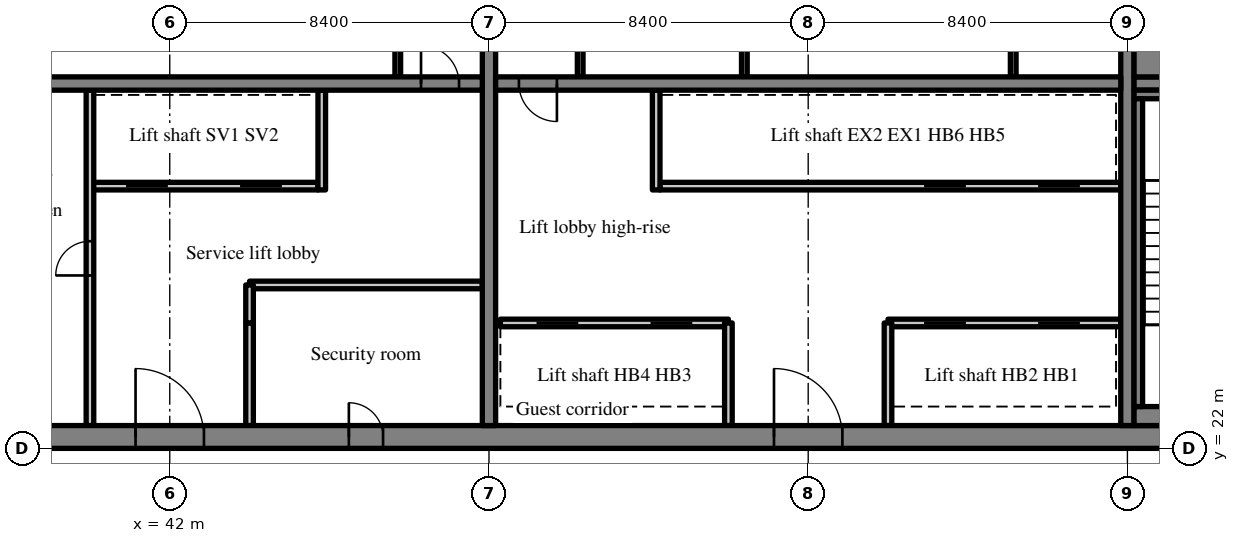
"""IFC4 building model, lengths in metres.
Left out: names, types, materials, properties, quantities, classifications, styles, units other than length and angle.
Written with IfcOpenShell. Run it as: python <this file> out.ifc"""

import sys

from ifc_helpers import new_model, si_unit, direction, frame, frame_2d, origin, place, context, subcontext, project, spatial, rectangle, extrude, source, transform, mapped, element, fill, save


model = new_model("IFC4")
c1 = context("Model", 3, precision=1e-05, world=origin(), true_north=direction((0.0, 1.0)))
c2 = subcontext(c1, "Body", "Model", "MODEL_VIEW")
j1 = project(units=[si_unit("LENGTHUNIT", "METRE"), si_unit("PLANEANGLEUNIT", "RADIAN")], contexts=[c1])
p1 = place(None, origin())
s1 = spatial("IfcSite", under=j1, at=p1, CompositionType="ELEMENT")
p2 = place(p1, origin())
s2 = spatial("IfcBuilding", under=s1, at=p2, CompositionType="ELEMENT")
p3 = place(p2, frame((0.0, 0.0, 260.8)))
s3 = spatial("IfcBuildingStorey", under=s2, at=p3, CompositionType="ELEMENT", Elevation=260.8)
m1 = source(origin(), c2, "Body", "SweptSolid", [
    extrude(rectangle(XDim=50.4, YDim=0.6, at=frame_2d((25.2, 0.0))), origin(), (0.0, 0.0, 1.0), 3.62),
])
p4 = place(p3, frame((25.2, 22.3, 0.0), z_axis=(0.0, 0.0, 1.0), x_axis=(1.0, 0.0, 0.0)))
e1 = element("IfcWall", 1, at=p4, inside=s3, PredefinedType="SHEAR", context=c2, shape_type="MappedRepresentation", body=[
    mapped(m1, transform((0.0, 0.0, 0.0), scale=1.0)),
])
m2 = source(origin(), c2, "Body", "SweptSolid", [
    extrude(rectangle(XDim=1.8, YDim=2.1, at=frame_2d((0.9, 1.05))), frame((0.0, 0.31, 0.0), z_axis=(0.0, -1.0, 0.0), x_axis=(1.0, 0.0, 0.0)), (0.0, 0.0, 1.0), 0.62),
])
p5 = place(p4, frame((15.9, 0.0, 0.0)))
e2 = element("IfcOpeningElement", 2, at=p5, cuts=e1, PredefinedType="OPENING", context=c2, shape_type="MappedRepresentation", body=[
    mapped(m2, transform((0.0, 0.0, 0.0), scale=1.0)),
])
m3 = source(origin(), c2, "Body", "SweptSolid", [
    extrude(rectangle(XDim=0.9, YDim=2.1, at=frame_2d((0.45, 1.05))), frame((0.0, 0.31, 0.0), z_axis=(0.0, -1.0, 0.0), x_axis=(1.0, 0.0, 0.0)), (0.0, 0.0, 1.0), 0.62),
])
p6 = place(p4, frame((9.687, 0.0, 0.0)))
e3 = element("IfcOpeningElement", 3, at=p6, cuts=e1, PredefinedType="OPENING", context=c2, shape_type="MappedRepresentation", body=[
    mapped(m3, transform((0.0, 0.0, 0.0), scale=1.0)),
])
p7 = place(p4, frame((21.513, 0.0, 0.0)))
e4 = element("IfcOpeningElement", 4, at=p7, cuts=e1, PredefinedType="OPENING", context=c2, shape_type="MappedRepresentation", body=[
    mapped(m3, transform((0.0, 0.0, 0.0), scale=1.0)),
])
p8 = place(p4, frame((32.7, 0.0, 0.0)))
e5 = element("IfcOpeningElement", 5, at=p8, cuts=e1, PredefinedType="OPENING", context=c2, shape_type="MappedRepresentation", body=[
    mapped(m2, transform((0.0, 0.0, 0.0), scale=1.0)),
])
m4 = source(origin(), c2, "Body", "SweptSolid", [
    extrude(rectangle(XDim=1.2, YDim=2.1, at=frame_2d((0.6, 1.05))), frame((0.0, 0.31, 0.0), z_axis=(0.0, -1.0, 0.0), x_axis=(1.0, 0.0, 0.0)), (0.0, 0.0, 1.0), 0.62),
])
p9 = place(p4, frame((6.488, 0.0, 0.0)))
e6 = element("IfcOpeningElement", 6, at=p9, cuts=e1, PredefinedType="OPENING", context=c2, shape_type="MappedRepresentation", body=[
    mapped(m4, transform((0.0, 0.0, 0.0), scale=1.0)),
])
p10 = place(p4, frame((47.925, 0.0, 0.0)))
e7 = element("IfcOpeningElement", 7, at=p10, cuts=e1, PredefinedType="OPENING", context=c2, shape_type="MappedRepresentation", body=[
    mapped(m4, transform((0.0, 0.0, 0.0), scale=1.0)),
])
m5 = source(origin(), c2, "Body", "SweptSolid", [
    extrude(rectangle(XDim=18.8, YDim=0.35, at=frame_2d((9.4, 0.0))), origin(), (0.0, 0.0, 1.0), 3.62),
])
p11 = place(p3, frame((50.4, 22.6, 0.0), z_axis=(0.0, 0.0, 1.0), x_axis=(0.0, 1.0, 0.0)))
e8 = element("IfcWall", 8, at=p11, inside=s3, PredefinedType="SHEAR", context=c2, shape_type="MappedRepresentation", body=[
    mapped(m5, transform((0.0, 0.0, 0.0), scale=1.0)),
])
m6 = source(origin(), c2, "Body", "SweptSolid", [
    extrude(rectangle(XDim=1.1, YDim=2.1, at=frame_2d((0.55, 1.05))), frame((0.0, 0.185, 0.0), z_axis=(0.0, -1.0, 0.0), x_axis=(1.0, 0.0, 0.0)), (0.0, 0.0, 1.0), 0.37),
])
p12 = place(p11, frame((12.85, 0.0, 0.0)))
e9 = element("IfcOpeningElement", 9, at=p12, cuts=e8, PredefinedType="OPENING", context=c2, shape_type="MappedRepresentation", body=[
    mapped(m6, transform((0.0, 0.0, 0.0), scale=1.0)),
])
p13 = place(p3, frame((67.2, 22.6, 0.0), z_axis=(0.0, 0.0, 1.0), x_axis=(0.0, 1.0, 0.0)))
e10 = element("IfcWall", 10, at=p13, inside=s3, PredefinedType="SHEAR", context=c2, shape_type="MappedRepresentation", body=[
    mapped(m5, transform((0.0, 0.0, 0.0), scale=1.0)),
])
m7 = source(origin(), c2, "Body", "SweptSolid", [
    extrude(rectangle(XDim=16.45, YDim=0.35, at=frame_2d((8.225, 0.0))), origin(), (0.0, 0.0, 1.0), 3.62),
])
p14 = place(p3, frame((33.775, 31.6, 0.0), z_axis=(0.0, 0.0, 1.0), x_axis=(1.0, 0.0, 0.0)))
e11 = element("IfcWall", 11, at=p14, inside=s3, PredefinedType="SHEAR", context=c2, shape_type="MappedRepresentation", body=[
    mapped(m7, transform((0.0, 0.0, 0.0), scale=1.0)),
])
m8 = source(origin(), c2, "Body", "SweptSolid", [
    extrude(rectangle(XDim=1.0, YDim=2.1, at=frame_2d((0.5, 1.05))), frame((0.0, 0.185, 0.0), z_axis=(0.0, -1.0, 0.0), x_axis=(1.0, 0.0, 0.0)), (0.0, 0.0, 1.0), 0.37),
])
p15 = place(p14, frame((14.837, 0.0, 0.0)))
e12 = element("IfcOpeningElement", 12, at=p15, cuts=e11, PredefinedType="OPENING", context=c2, shape_type="MappedRepresentation", body=[
    mapped(m8, transform((0.0, 0.0, 0.0), scale=1.0)),
])
m9 = source(origin(), c2, "Body", "SweptSolid", [
    extrude(rectangle(XDim=16.45, YDim=0.35, at=frame_2d((8.225, 0.0))), origin(), (0.0, 0.0, 1.0), 3.62),
])
p16 = place(p3, frame((50.575, 31.6, 0.0), z_axis=(0.0, 0.0, 1.0), x_axis=(1.0, 0.0, 0.0)))
e13 = element("IfcWall", 13, at=p16, inside=s3, PredefinedType="SHEAR", context=c2, shape_type="MappedRepresentation", body=[
    mapped(m9, transform((0.0, 0.0, 0.0), scale=1.0)),
])
p17 = place(p16, frame((0.613, 0.0, 0.0)))
e14 = element("IfcOpeningElement", 14, at=p17, cuts=e13, PredefinedType="OPENING", context=c2, shape_type="MappedRepresentation", body=[
    mapped(m8, transform((0.0, 0.0, 0.0), scale=1.0)),
])
m10 = source(origin(), c2, "Body", "SweptSolid", [
    extrude(rectangle(XDim=7.625, YDim=0.35, at=frame_2d((3.812, 0.0))), origin(), (0.0, 0.0, 1.0), 3.62),
])
p18 = place(p3, frame((67.375, 31.6, 0.0), z_axis=(0.0, 0.0, 1.0), x_axis=(1.0, 0.0, 0.0)))
e15 = element("IfcWall", 15, at=p18, inside=s3, PredefinedType="SHEAR", context=c2, shape_type="MappedRepresentation", body=[
    mapped(m10, transform((0.0, 0.0, 0.0), scale=1.0)),
])
p19 = place(p18, frame((5.8, 0.0, 0.0)))
e16 = element("IfcOpeningElement", 16, at=p19, cuts=e15, PredefinedType="OPENING", context=c2, shape_type="MappedRepresentation", body=[
    mapped(m6, transform((0.0, 0.0, 0.0), scale=1.0)),
])
m11 = source(origin(), c2, "Body", "SweptSolid", [
    extrude(rectangle(XDim=6.0, YDim=0.2, at=frame_2d((3.0, 0.0))), origin(), (0.0, 0.0, 1.0), 3.62),
])
p20 = place(p3, frame((39.9, 28.9, 0.0), z_axis=(0.0, 0.0, 1.0), x_axis=(1.0, 0.0, 0.0)))
e17 = element("IfcWall", 17, at=p20, inside=s3, PredefinedType="SOLIDWALL", context=c2, shape_type="MappedRepresentation", body=[
    mapped(m11, transform((0.0, 0.0, 0.0), scale=1.0)),
])
m12 = source(origin(), c2, "Body", "SweptSolid", [
    extrude(rectangle(XDim=1.1, YDim=2.1, at=frame_2d((0.55, 1.05))), frame((0.0, 0.11, 0.0), z_axis=(0.0, -1.0, 0.0), x_axis=(1.0, 0.0, 0.0)), (0.0, 0.0, 1.0), 0.22),
])
p21 = place(p20, frame((0.95, 0.0, 0.0)))
e18 = element("IfcOpeningElement", 18, at=p21, cuts=e17, PredefinedType="OPENING", context=c2, shape_type="MappedRepresentation", body=[
    mapped(m12, transform((0.0, 0.0, 0.0), scale=1.0)),
])
p22 = place(p20, frame((3.95, 0.0, 0.0)))
e19 = element("IfcOpeningElement", 19, at=p22, cuts=e17, PredefinedType="OPENING", context=c2, shape_type="MappedRepresentation", body=[
    mapped(m12, transform((0.0, 0.0, 0.0), scale=1.0)),
])
m13 = source(origin(), c2, "Body", "SweptSolid", [
    extrude(rectangle(XDim=8.825, YDim=0.2, at=frame_2d((4.413, 0.0))), origin(), (0.0, 0.0, 1.0), 3.62),
])
p23 = place(p3, frame((39.9, 22.6, 0.0), z_axis=(0.0, 0.0, 1.0), x_axis=(0.0, 1.0, 0.0)))
e20 = element("IfcWall", 20, at=p23, inside=s3, PredefinedType="PARTITIONING", context=c2, shape_type="MappedRepresentation", body=[
    mapped(m13, transform((0.0, 0.0, 0.0), scale=1.0)),
])
m14 = source(origin(), c2, "Body", "SweptSolid", [
    extrude(rectangle(XDim=0.9, YDim=2.1, at=frame_2d((0.45, 1.05))), frame((0.0, 0.11, 0.0), z_axis=(0.0, -1.0, 0.0), x_axis=(1.0, 0.0, 0.0)), (0.0, 0.0, 1.0), 0.22),
])
p24 = place(p23, frame((3.95, 0.0, 0.0)))
e21 = element("IfcOpeningElement", 21, at=p24, cuts=e20, PredefinedType="OPENING", context=c2, shape_type="MappedRepresentation", body=[
    mapped(m14, transform((0.0, 0.0, 0.0), scale=1.0)),
])
m15 = source(origin(), c2, "Body", "SweptSolid", [
    extrude(rectangle(XDim=2.7, YDim=0.2, at=frame_2d((1.35, 0.0))), origin(), (0.0, 0.0, 1.0), 3.62),
])
p25 = place(p3, frame((44.1, 22.6, 0.0), z_axis=(0.0, 0.0, 1.0), x_axis=(0.0, 1.0, 0.0)))
e22 = element("IfcWall", 22, at=p25, inside=s3, PredefinedType="PARTITIONING", context=c2, shape_type="MappedRepresentation", body=[
    mapped(m15, transform((0.0, 0.0, 0.0), scale=1.0)),
])
m16 = source(origin(), c2, "Body", "SweptSolid", [
    extrude(rectangle(XDim=2.625, YDim=0.2, at=frame_2d((1.312, 0.0))), origin(), (0.0, 0.0, 1.0), 3.62),
])
p26 = place(p3, frame((46.0, 28.8, 0.0), z_axis=(0.0, 0.0, 1.0), x_axis=(0.0, 1.0, 0.0)))
e23 = element("IfcWall", 23, at=p26, inside=s3, PredefinedType="SOLIDWALL", context=c2, shape_type="MappedRepresentation", body=[
    mapped(m16, transform((0.0, 0.0, 0.0), scale=1.0)),
])
m17 = source(origin(), c2, "Body", "SweptSolid", [
    extrude(rectangle(XDim=6.125, YDim=0.2, at=frame_2d((3.062, 0.0))), origin(), (0.0, 0.0, 1.0), 3.62),
])
p27 = place(p3, frame((44.1, 26.3, 0.0), z_axis=(0.0, 0.0, 1.0), x_axis=(1.0, 0.0, 0.0)))
e24 = element("IfcWall", 24, at=p27, inside=s3, PredefinedType="PARTITIONING", context=c2, shape_type="MappedRepresentation", body=[
    mapped(m17, transform((0.0, 0.0, 0.0), scale=1.0)),
])
m18 = source(origin(), c2, "Body", "SweptSolid", [
    extrude(rectangle(XDim=1.0, YDim=0.2, at=frame_2d((0.5, 0.0))), origin(), (0.0, 0.0, 1.0), 3.62),
])
p28 = place(p3, frame((44.1, 25.3, 0.0), z_axis=(0.0, 0.0, 1.0), x_axis=(0.0, 1.0, 0.0)))
e25 = element("IfcWall", 25, at=p28, inside=s3, PredefinedType="PARTITIONING", context=c2, shape_type="MappedRepresentation", body=[
    mapped(m18, transform((0.0, 0.0, 0.0), scale=1.0)),
])
m19 = source(origin(), c2, "Body", "SweptSolid", [
    extrude(rectangle(XDim=3.225, YDim=0.15, at=frame_2d((1.613, 0.0))), origin(), (0.0, 0.0, 1.0), 3.62),
])
p29 = place(p3, frame((48.0, 31.775, 0.0), z_axis=(0.0, 0.0, 1.0), x_axis=(0.0, 1.0, 0.0)))
e26 = element("IfcWall", 26, at=p29, inside=s3, PredefinedType="PARTITIONING", context=c2, shape_type="MappedRepresentation", body=[
    mapped(m19, transform((0.0, 0.0, 0.0), scale=1.0)),
])
p30 = place(p3, frame((67.025, 25.3, 0.0), z_axis=(0.0, 0.0, 1.0), x_axis=(-1.0, 0.0, 0.0)))
e27 = element("IfcWall", 27, at=p30, inside=s3, PredefinedType="SOLIDWALL", context=c2, shape_type="MappedRepresentation", body=[
    mapped(m17, transform((0.0, 0.0, 0.0), scale=1.0)),
])
p31 = place(p30, frame((1.075, 0.0, 0.0)))
e28 = element("IfcOpeningElement", 28, at=p31, cuts=e27, PredefinedType="OPENING", context=c2, shape_type="MappedRepresentation", body=[
    mapped(m12, transform((0.0, 0.0, 0.0), scale=1.0)),
])
p32 = place(p30, frame((4.075, 0.0, 0.0)))
e29 = element("IfcOpeningElement", 29, at=p32, cuts=e27, PredefinedType="OPENING", context=c2, shape_type="MappedRepresentation", body=[
    mapped(m12, transform((0.0, 0.0, 0.0), scale=1.0)),
])
p33 = place(p3, frame((56.7, 25.3, 0.0), z_axis=(0.0, 0.0, 1.0), x_axis=(-1.0, 0.0, 0.0)))
e30 = element("IfcWall", 30, at=p33, inside=s3, PredefinedType="SOLIDWALL", context=c2, shape_type="MappedRepresentation", body=[
    mapped(m11, transform((0.0, 0.0, 0.0), scale=1.0)),
])
p34 = place(p33, frame((0.95, 0.0, 0.0)))
e31 = element("IfcOpeningElement", 31, at=p34, cuts=e30, PredefinedType="OPENING", context=c2, shape_type="MappedRepresentation", body=[
    mapped(m12, transform((0.0, 0.0, 0.0), scale=1.0)),
])
p35 = place(p33, frame((3.95, 0.0, 0.0)))
e32 = element("IfcOpeningElement", 32, at=p35, cuts=e30, PredefinedType="OPENING", context=c2, shape_type="MappedRepresentation", body=[
    mapped(m12, transform((0.0, 0.0, 0.0), scale=1.0)),
])
m20 = source(origin(), c2, "Body", "SweptSolid", [
    extrude(rectangle(XDim=12.125, YDim=0.2, at=frame_2d((6.062, 0.0))), origin(), (0.0, 0.0, 1.0), 3.62),
])
p36 = place(p3, frame((67.025, 28.9, 0.0), z_axis=(0.0, 0.0, 1.0), x_axis=(-1.0, 0.0, 0.0)))
e33 = element("IfcWall", 33, at=p36, inside=s3, PredefinedType="SOLIDWALL", context=c2, shape_type="MappedRepresentation", body=[
    mapped(m20, transform((0.0, 0.0, 0.0), scale=1.0)),
])
p37 = place(p36, frame((1.075, 0.0, 0.0)))
e34 = element("IfcOpeningElement", 34, at=p37, cuts=e33, PredefinedType="OPENING", context=c2, shape_type="MappedRepresentation", body=[
    mapped(m12, transform((0.0, 0.0, 0.0), scale=1.0)),
])
p38 = place(p36, frame((4.075, 0.0, 0.0)))
e35 = element("IfcOpeningElement", 35, at=p38, cuts=e33, PredefinedType="OPENING", context=c2, shape_type="MappedRepresentation", body=[
    mapped(m12, transform((0.0, 0.0, 0.0), scale=1.0)),
])
for number, where, z_axis, x_axis in (
    (36, (60.9, 22.6, 0.0), (0.0, 0.0, 1.0), (0.0, 1.0, 0.0)),
    (37, (56.7, 22.6, 0.0), (0.0, 0.0, 1.0), (0.0, 1.0, 0.0)),
):
    element("IfcWall", number, at=place(p3, frame(where, z_axis=z_axis, x_axis=x_axis)), inside=s3, PredefinedType="SOLIDWALL", context=c2, shape_type="MappedRepresentation", body=[
        mapped(m15, transform((0.0, 0.0, 0.0), scale=1.0)),
    ])
p39 = place(p3, frame((54.8, 28.8, 0.0), z_axis=(0.0, 0.0, 1.0), x_axis=(0.0, 1.0, 0.0)))
e38 = element("IfcWall", 38, at=p39, inside=s3, PredefinedType="SOLIDWALL", context=c2, shape_type="MappedRepresentation", body=[
    mapped(m16, transform((0.0, 0.0, 0.0), scale=1.0)),
])
for number, where, z_axis, x_axis in (
    (39, (52.8, 31.775, 0.0), (0.0, 0.0, 1.0), (0.0, 1.0, 0.0)),
    (40, (64.195, 31.775, 0.0), (0.0, 0.0, 1.0), (0.0, 1.0, 0.0)),
    (41, (57.12, 31.775, 0.0), (0.0, 0.0, 1.0), (0.0, 1.0, 0.0)),
):
    element("IfcWall", number, at=place(p3, frame(where, z_axis=z_axis, x_axis=x_axis)), inside=s3, PredefinedType="PARTITIONING", context=c2, shape_type="MappedRepresentation", body=[
        mapped(m19, transform((0.0, 0.0, 0.0), scale=1.0)),
    ])
m21 = source(origin(), c2, "Body", "SweptSolid", [
    extrude(rectangle(XDim=4.875, YDim=0.5, at=frame_2d((2.438, 0.0))), origin(), (0.0, 0.0, 1.0), 3.62),
])
p40 = place(p3, frame((67.375, 22.85, 0.0), z_axis=(0.0, 0.0, 1.0), x_axis=(1.0, 0.0, 0.0)))
e42 = element("IfcWall", 42, at=p40, inside=s3, PredefinedType="SOLIDWALL", context=c2, shape_type="MappedRepresentation", body=[
    mapped(m21, transform((0.0, 0.0, 0.0), scale=1.0)),
])
m22 = source(origin(), c2, "Body", "SweptSolid", [
    extrude(rectangle(XDim=4.875, YDim=0.225, at=frame_2d((2.438, 0.0))), origin(), (0.0, 0.0, 1.0), 3.62),
])
p41 = place(p3, frame((67.375, 31.312, 0.0), z_axis=(0.0, 0.0, 1.0), x_axis=(1.0, 0.0, 0.0)))
e43 = element("IfcWall", 43, at=p41, inside=s3, PredefinedType="SOLIDWALL", context=c2, shape_type="MappedRepresentation", body=[
    mapped(m22, transform((0.0, 0.0, 0.0), scale=1.0)),
])
m23 = source(origin(), c2, "Body", "SweptSolid", [
    extrude(rectangle(XDim=8.1, YDim=0.225, at=frame_2d((4.05, 0.0))), origin(), (0.0, 0.0, 1.0), 3.62),
])
p42 = place(p3, frame((67.487, 23.1, 0.0), z_axis=(0.0, 0.0, 1.0), x_axis=(0.0, 1.0, 0.0)))
e44 = element("IfcWall", 44, at=p42, inside=s3, PredefinedType="SOLIDWALL", context=c2, shape_type="MappedRepresentation", body=[
    mapped(m23, transform((0.0, 0.0, 0.0), scale=1.0)),
])
m24 = source(origin(), c2, "Body", "SweptSolid", [
    extrude(rectangle(XDim=4.875, YDim=1.025, at=frame_2d((2.438, 0.0))), origin(), (0.0, 0.0, 1.0), 3.62),
])
p43 = place(p3, frame((67.375, 32.287, 0.0), z_axis=(0.0, 0.0, 1.0), x_axis=(1.0, 0.0, 0.0)))
e45 = element("IfcWall", 45, at=p43, inside=s3, PredefinedType="SOLIDWALL", context=c2, shape_type="MappedRepresentation", body=[
    mapped(m24, transform((0.0, 0.0, 0.0), scale=1.0)),
])
m25 = source(origin(), c2, "Body", "SweptSolid", [
    extrude(rectangle(XDim=1.8, YDim=2.1, at=frame_2d((0.9, 1.05))), frame((0.0, 0.225, 0.0), z_axis=(0.0, -1.0, 0.0), x_axis=(1.0, 0.0, 0.0)), (0.0, 0.0, 1.0), 0.05),
])
p44 = place(p5, origin())
e46 = element("IfcDoor", 46, at=p44, inside=s3, OperationType="DOUBLE_DOOR_SINGLE_SWING", PredefinedType="DOOR", context=c2, shape_type="MappedRepresentation", body=[
    mapped(m25, transform((0.0, 0.0, 0.0), scale=1.0)),
])
fill(e2, e46)
m26 = source(origin(), c2, "Body", "SweptSolid", [
    extrude(rectangle(XDim=1.0, YDim=2.1, at=frame_2d((0.5, 1.05))), frame((0.0, 0.025, 0.0), z_axis=(0.0, -1.0, 0.0), x_axis=(1.0, 0.0, 0.0)), (0.0, 0.0, 1.0), 0.05),
])
p45 = place(p15, origin())
e47 = element("IfcDoor", 47, at=p45, inside=s3, OperationType="SINGLE_SWING_LEFT", PredefinedType="DOOR", context=c2, shape_type="MappedRepresentation", body=[
    mapped(m26, transform((0.0, 0.0, 0.0), scale=1.0)),
])
fill(e12, e47)
m27 = source(origin(), c2, "Body", "SweptSolid", [
    extrude(rectangle(XDim=1.1, YDim=2.1, at=frame_2d((0.55, 1.05))), frame((0.0, 0.025, 0.0), z_axis=(0.0, -1.0, 0.0), x_axis=(1.0, 0.0, 0.0)), (0.0, 0.0, 1.0), 0.05),
])
p46 = place(p21, origin())
e48 = element("IfcDoor", 48, at=p46, inside=s3, OperationType="SLIDING_TO_LEFT", PredefinedType="DOOR", context=c2, shape_type="MappedRepresentation", body=[
    mapped(m27, transform((0.0, 0.0, 0.0), scale=1.0)),
])
fill(e18, e48)
p47 = place(p22, origin())
e49 = element("IfcDoor", 49, at=p47, inside=s3, OperationType="SLIDING_TO_RIGHT", PredefinedType="DOOR", context=c2, shape_type="MappedRepresentation", body=[
    mapped(m27, transform((0.0, 0.0, 0.0), scale=1.0)),
])
fill(e19, e49)
m28 = source(origin(), c2, "Body", "SweptSolid", [
    extrude(rectangle(XDim=0.9, YDim=2.1, at=frame_2d((0.45, 1.05))), frame((0.0, 0.025, 0.0), z_axis=(0.0, -1.0, 0.0), x_axis=(1.0, 0.0, 0.0)), (0.0, 0.0, 1.0), 0.05),
])
p48 = place(p24, origin())
e50 = element("IfcDoor", 50, at=p48, inside=s3, OperationType="SINGLE_SWING_LEFT", PredefinedType="DOOR", context=c2, shape_type="MappedRepresentation", body=[
    mapped(m28, transform((0.0, 0.0, 0.0), scale=1.0)),
])
fill(e21, e50)
m29 = source(origin(), c2, "Body", "SweptSolid", [
    extrude(rectangle(XDim=0.9, YDim=2.1, at=frame_2d((0.45, 1.05))), frame((0.0, 0.225, 0.0), z_axis=(0.0, -1.0, 0.0), x_axis=(1.0, 0.0, 0.0)), (0.0, 0.0, 1.0), 0.05),
])
p49 = place(p7, origin())
e51 = element("IfcDoor", 51, at=p49, inside=s3, OperationType="SINGLE_SWING_LEFT", PredefinedType="DOOR", context=c2, shape_type="MappedRepresentation", body=[
    mapped(m29, transform((0.0, 0.0, 0.0), scale=1.0)),
])
fill(e4, e51)
p50 = place(p8, origin())
e52 = element("IfcDoor", 52, at=p50, inside=s3, OperationType="DOUBLE_DOOR_SINGLE_SWING", PredefinedType="DOOR", context=c2, shape_type="MappedRepresentation", body=[
    mapped(m25, transform((0.0, 0.0, 0.0), scale=1.0)),
])
fill(e5, e52)
p51 = place(p17, origin())
e53 = element("IfcDoor", 53, at=p51, inside=s3, OperationType="SINGLE_SWING_RIGHT", PredefinedType="DOOR", context=c2, shape_type="MappedRepresentation", body=[
    mapped(m26, transform((0.0, 0.0, 0.0), scale=1.0)),
])
fill(e14, e53)
p52 = place(p31, origin())
e54 = element("IfcDoor", 54, at=p52, inside=s3, OperationType="SLIDING_TO_RIGHT", PredefinedType="DOOR", context=c2, shape_type="MappedRepresentation", body=[
    mapped(m27, transform((0.0, 0.0, 0.0), scale=1.0)),
])
fill(e28, e54)
p53 = place(p32, origin())
e55 = element("IfcDoor", 55, at=p53, inside=s3, OperationType="SLIDING_TO_LEFT", PredefinedType="DOOR", context=c2, shape_type="MappedRepresentation", body=[
    mapped(m27, transform((0.0, 0.0, 0.0), scale=1.0)),
])
fill(e29, e55)
p54 = place(p34, origin())
e56 = element("IfcDoor", 56, at=p54, inside=s3, OperationType="SLIDING_TO_RIGHT", PredefinedType="DOOR", context=c2, shape_type="MappedRepresentation", body=[
    mapped(m27, transform((0.0, 0.0, 0.0), scale=1.0)),
])
fill(e31, e56)
p55 = place(p35, origin())
e57 = element("IfcDoor", 57, at=p55, inside=s3, OperationType="SLIDING_TO_LEFT", PredefinedType="DOOR", context=c2, shape_type="MappedRepresentation", body=[
    mapped(m27, transform((0.0, 0.0, 0.0), scale=1.0)),
])
fill(e32, e57)
p56 = place(p37, origin())
e58 = element("IfcDoor", 58, at=p56, inside=s3, OperationType="SLIDING_TO_RIGHT", PredefinedType="DOOR", context=c2, shape_type="MappedRepresentation", body=[
    mapped(m27, transform((0.0, 0.0, 0.0), scale=1.0)),
])
fill(e34, e58)
p57 = place(p38, origin())
e59 = element("IfcDoor", 59, at=p57, inside=s3, OperationType="SLIDING_TO_LEFT", PredefinedType="DOOR", context=c2, shape_type="MappedRepresentation", body=[
    mapped(m27, transform((0.0, 0.0, 0.0), scale=1.0)),
])
fill(e35, e59)
save(model, sys.argv[1])
